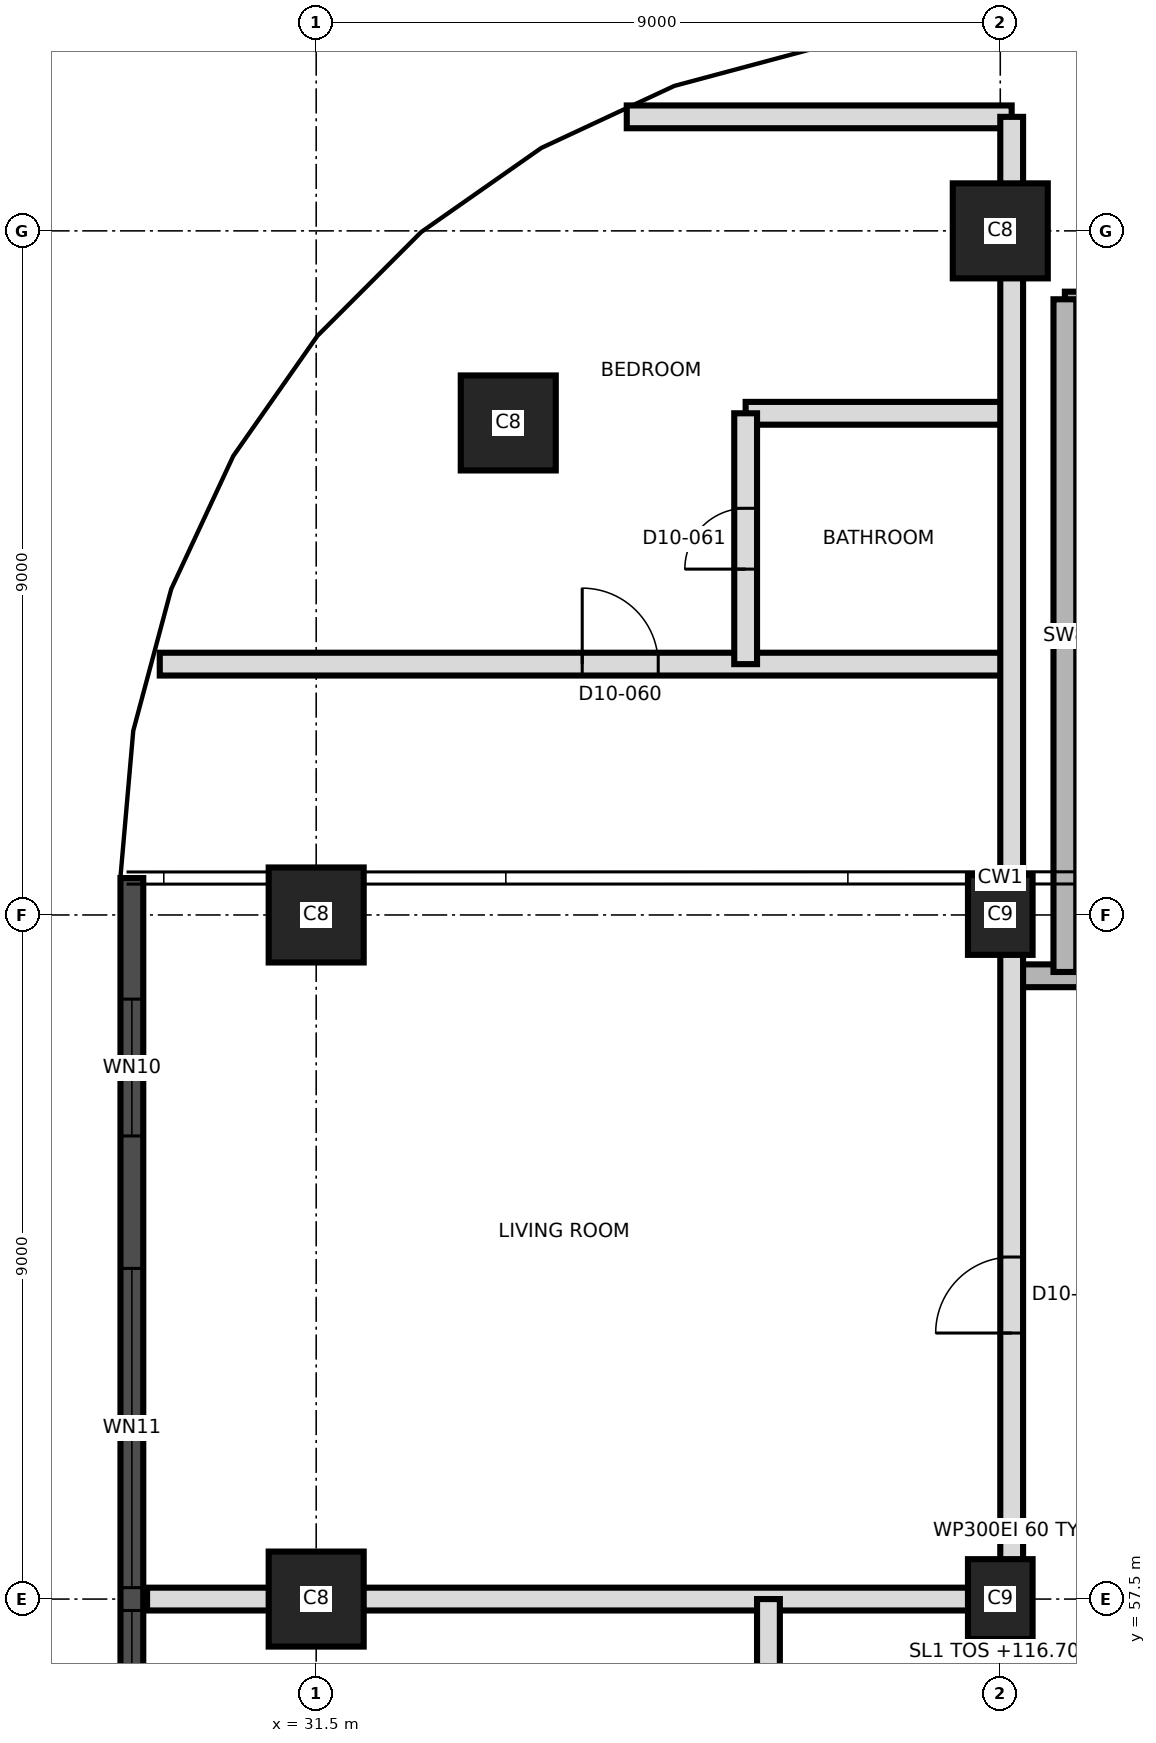
"""IFC4 building model, lengths in metres.
Left out: names, types, materials, properties, quantities, classifications, styles, units other than length and angle.
Written with IfcOpenShell. Run it as: python <this file> out.ifc"""

import sys

from ifc_helpers import new_model, si_unit, direction, frame, frame_2d, origin, origin_2d, place, context, subcontext, project, spatial, rectangle, extrude, element, fill, save


model = new_model("IFC4")
c1 = context("Model", 3, precision=1e-05, world=origin(), true_north=direction((0.0, 1.0)))
c2 = subcontext(c1, "Body", "Model", "MODEL_VIEW")
j1 = project(units=[si_unit("LENGTHUNIT", "METRE"), si_unit("PLANEANGLEUNIT", "RADIAN")], contexts=[c1])
p1 = place(None, origin())
s1 = spatial("IfcSite", under=j1, at=p1, CompositionType="ELEMENT")
p2 = place(p1, origin())
s2 = spatial("IfcBuilding", under=s1, at=p2, CompositionType="ELEMENT")
p3 = place(p2, frame((0.0, 0.0, 116.7)))
s3 = spatial("IfcBuildingStorey", under=s2, at=p3, CompositionType="ELEMENT", Elevation=116.7)
p4 = place(p3, frame((31.5, 57.5, 0.0), z_axis=(0.0, 0.0, 1.0), x_axis=(1.0, 0.0, 0.0)))
e1 = element("IfcColumn", 1, at=p4, inside=s3, PredefinedType="COLUMN", context=c2, shape_type="SweptSolid", body=[
    extrude(rectangle(XDim=1.25, YDim=1.25, at=origin_2d()), origin(), (0.0, 0.0, 1.0), 3.7),
])
p5 = place(p3, frame((40.5, 57.5, 0.0), z_axis=(0.0, 0.0, 1.0), x_axis=(0.0, 1.0, 0.0)))
e2 = element("IfcColumn", 2, at=p5, inside=s3, PredefinedType="COLUMN", context=c2, shape_type="SweptSolid", body=[
    extrude(rectangle(XDim=1.05, YDim=0.85, at=origin_2d()), origin(), (0.0, 0.0, 1.0), 3.7),
])
p6 = place(p3, frame((31.5, 66.5, 0.0), z_axis=(0.0, 0.0, 1.0), x_axis=(1.0, 0.0, 0.0)))
e3 = element("IfcColumn", 3, at=p6, inside=s3, PredefinedType="COLUMN", context=c2, shape_type="SweptSolid", body=[
    extrude(rectangle(XDim=1.25, YDim=1.25, at=origin_2d()), origin(), (0.0, 0.0, 1.0), 3.7),
])
p7 = place(p3, frame((40.5, 66.5, 0.0), z_axis=(0.0, 0.0, 1.0), x_axis=(0.0, 1.0, 0.0)))
e4 = element("IfcColumn", 4, at=p7, inside=s3, PredefinedType="COLUMN", context=c2, shape_type="SweptSolid", body=[
    extrude(rectangle(XDim=1.05, YDim=0.85, at=origin_2d()), origin(), (0.0, 0.0, 1.0), 3.7),
])
for number, where, z_axis, x_axis in (
    (5, (34.027, 72.973, 0.0), (0.0, 0.0, 1.0), (1.0, 0.0, 0.0)),
    (6, (40.5, 75.5, 0.0), (0.0, 0.0, 1.0), (1.0, 0.0, 0.0)),
):
    element("IfcColumn", number, at=place(p3, frame(where, z_axis=z_axis, x_axis=x_axis)), inside=s3, PredefinedType="COLUMN", context=c2, shape_type="SweptSolid", body=[
        extrude(rectangle(XDim=1.25, YDim=1.25, at=origin_2d()), origin(), (0.0, 0.0, 1.0), 3.7),
    ])
p8 = place(p3, frame((29.075, 66.986, 0.0), z_axis=(0.0, 0.0, 1.0), x_axis=(0.0, -1.0, 0.0)))
e7 = element("IfcWall", 7, at=p8, inside=s3, PredefinedType="SOLIDWALL", context=c2, shape_type="SweptSolid", body=[
    extrude(rectangle(XDim=32.976, YDim=0.3, at=frame_2d((16.488, 0.0))), origin(), (0.0, 0.0, 1.0), 3.4),
])
p9 = place(p8, frame((1.593, 0.0, 0.3)))
e8 = element("IfcOpeningElement", 8, at=p9, cuts=e7, PredefinedType="OPENING", context=c2, shape_type="SweptSolid", body=[
    extrude(rectangle(XDim=1.8, YDim=2.4, at=frame_2d((0.9, 1.2))), frame((0.0, 0.16, 0.0), z_axis=(0.0, -1.0, 0.0), x_axis=(1.0, 0.0, 0.0)), (0.0, 0.0, 1.0), 0.32),
])
p10 = place(p8, frame((5.136, 0.0, 0.9)))
e9 = element("IfcOpeningElement", 9, at=p10, cuts=e7, PredefinedType="OPENING", context=c2, shape_type="SweptSolid", body=[
    extrude(rectangle(XDim=4.2, YDim=1.5, at=frame_2d((2.1, 0.75))), frame((0.0, 0.16, 0.0), z_axis=(0.0, -1.0, 0.0), x_axis=(1.0, 0.0, 0.0)), (0.0, 0.0, 1.0), 0.32),
])
p11 = place(p8, frame((9.636, 0.0, 0.9)))
e10 = element("IfcOpeningElement", 10, at=p11, cuts=e7, PredefinedType="OPENING", context=c2, shape_type="SweptSolid", body=[
    extrude(rectangle(XDim=4.2, YDim=1.5, at=frame_2d((2.1, 0.75))), frame((0.0, 0.16, 0.0), z_axis=(0.0, -1.0, 0.0), x_axis=(1.0, 0.0, 0.0)), (0.0, 0.0, 1.0), 0.32),
])
p12 = place(p8, frame((14.136, 0.0, 0.9)))
e11 = element("IfcOpeningElement", 11, at=p12, cuts=e7, PredefinedType="OPENING", context=c2, shape_type="SweptSolid", body=[
    extrude(rectangle(XDim=4.2, YDim=1.5, at=frame_2d((2.1, 0.75))), frame((0.0, 0.16, 0.0), z_axis=(0.0, -1.0, 0.0), x_axis=(1.0, 0.0, 0.0)), (0.0, 0.0, 1.0), 0.32),
])
p13 = place(p8, frame((18.636, 0.0, 0.9)))
e12 = element("IfcOpeningElement", 12, at=p13, cuts=e7, PredefinedType="OPENING", context=c2, shape_type="SweptSolid", body=[
    extrude(rectangle(XDim=4.2, YDim=1.5, at=frame_2d((2.1, 0.75))), frame((0.0, 0.16, 0.0), z_axis=(0.0, -1.0, 0.0), x_axis=(1.0, 0.0, 0.0)), (0.0, 0.0, 1.0), 0.32),
])
p14 = place(p8, frame((23.136, 0.0, 0.9)))
e13 = element("IfcOpeningElement", 13, at=p14, cuts=e7, PredefinedType="OPENING", context=c2, shape_type="SweptSolid", body=[
    extrude(rectangle(XDim=4.2, YDim=1.5, at=frame_2d((2.1, 0.75))), frame((0.0, 0.16, 0.0), z_axis=(0.0, -1.0, 0.0), x_axis=(1.0, 0.0, 0.0)), (0.0, 0.0, 1.0), 0.32),
])
p15 = place(p8, frame((29.331, 0.0, 0.3)))
e14 = element("IfcOpeningElement", 14, at=p15, cuts=e7, PredefinedType="OPENING", context=c2, shape_type="SweptSolid", body=[
    extrude(rectangle(XDim=1.8, YDim=2.4, at=frame_2d((0.9, 1.2))), frame((0.0, 0.16, 0.0), z_axis=(0.0, -1.0, 0.0), x_axis=(1.0, 0.0, 0.0)), (0.0, 0.0, 1.0), 0.32),
])
p16 = place(p3, frame((29.275, 57.5, 0.0), z_axis=(0.0, 0.0, 1.0), x_axis=(1.0, 0.0, 0.0)))
e15 = element("IfcWall", 15, at=p16, inside=s3, PredefinedType="PARTITIONING", context=c2, shape_type="SweptSolid", body=[
    extrude(rectangle(XDim=11.375, YDim=0.3, at=frame_2d((5.688, 0.0))), origin(), (0.0, 0.0, 1.0), 3.4),
])
p17 = place(p3, frame((40.65, 65.7, 0.0), z_axis=(0.0, 0.0, 1.0), x_axis=(1.0, 0.0, 0.0)))
e16 = element("IfcWall", 16, at=p17, inside=s3, PredefinedType="SHEAR", context=c2, shape_type="SweptSolid", body=[
    extrude(rectangle(XDim=6.2, YDim=0.3, at=frame_2d((3.1, 0.0))), origin(), (0.0, 0.0, 1.0), 3.4),
])
p18 = place(p17, frame((1.1, 0.0, 0.0)))
e17 = element("IfcOpeningElement", 17, at=p18, cuts=e16, PredefinedType="OPENING", context=c2, shape_type="SweptSolid", body=[
    extrude(rectangle(XDim=1.2, YDim=2.1, at=frame_2d((0.6, 1.05))), frame((0.0, 0.16, 0.0), z_axis=(0.0, -1.0, 0.0), x_axis=(1.0, 0.0, 0.0)), (0.0, 0.0, 1.0), 0.32),
])
p19 = place(p3, frame((29.442, 69.8, 0.0), z_axis=(0.0, 0.0, 1.0), x_axis=(1.0, 0.0, 0.0)))
e18 = element("IfcWall", 18, at=p19, inside=s3, PredefinedType="PARTITIONING", context=c2, shape_type="SweptSolid", body=[
    extrude(rectangle(XDim=11.208, YDim=0.3, at=frame_2d((5.604, 0.0))), origin(), (0.0, 0.0, 1.0), 3.4),
])
p20 = place(p19, frame((5.558, 0.0, 0.0)))
e19 = element("IfcOpeningElement", 19, at=p20, cuts=e18, PredefinedType="OPENING", context=c2, shape_type="SweptSolid", body=[
    extrude(rectangle(XDim=1.0, YDim=2.1, at=frame_2d((0.5, 1.05))), frame((0.0, 0.16, 0.0), z_axis=(0.0, -1.0, 0.0), x_axis=(1.0, 0.0, 0.0)), (0.0, 0.0, 1.0), 0.32),
])
p21 = place(p3, frame((37.15, 73.1, 0.0), z_axis=(0.0, 0.0, 1.0), x_axis=(1.0, 0.0, 0.0)))
e20 = element("IfcWall", 20, at=p21, inside=s3, PredefinedType="PARTITIONING", context=c2, shape_type="SweptSolid", body=[
    extrude(rectangle(XDim=3.5, YDim=0.3, at=frame_2d((1.75, 0.0))), origin(), (0.0, 0.0, 1.0), 3.4),
])
p22 = place(p3, frame((41.35, 74.55, 0.0), z_axis=(0.0, 0.0, 1.0), x_axis=(1.0, 0.0, 0.0)))
e21 = element("IfcWall", 21, at=p22, inside=s3, PredefinedType="SHEAR", context=c2, shape_type="SweptSolid", body=[
    extrude(rectangle(XDim=3.0, YDim=0.3, at=frame_2d((1.5, 0.0))), origin(), (0.0, 0.0, 1.0), 3.4),
])
p23 = place(p3, frame((35.586, 77.0, 0.0), z_axis=(0.0, 0.0, 1.0), x_axis=(1.0, 0.0, 0.0)))
e22 = element("IfcWall", 22, at=p23, inside=s3, PredefinedType="PARTITIONING", context=c2, shape_type="SweptSolid", body=[
    extrude(rectangle(XDim=5.064, YDim=0.3, at=frame_2d((2.532, 0.0))), origin(), (0.0, 0.0, 1.0), 3.4),
])
p24 = place(p3, frame((37.15, 69.8, 0.0), z_axis=(0.0, 0.0, 1.0), x_axis=(0.0, 1.0, 0.0)))
e23 = element("IfcWall", 23, at=p24, inside=s3, PredefinedType="PARTITIONING", context=c2, shape_type="SweptSolid", body=[
    extrude(rectangle(XDim=3.3, YDim=0.3, at=frame_2d((1.65, 0.0))), origin(), (0.0, 0.0, 1.0), 3.4),
])
p25 = place(p24, frame((1.25, 0.0, 0.0)))
e24 = element("IfcOpeningElement", 24, at=p25, cuts=e23, PredefinedType="OPENING", context=c2, shape_type="SweptSolid", body=[
    extrude(rectangle(XDim=0.8, YDim=2.1, at=frame_2d((0.4, 1.05))), frame((0.0, 0.16, 0.0), z_axis=(0.0, -1.0, 0.0), x_axis=(1.0, 0.0, 0.0)), (0.0, 0.0, 1.0), 0.32),
])
p26 = place(p3, frame((37.45, 54.8, 0.0), z_axis=(0.0, 0.0, 1.0), x_axis=(0.0, 1.0, 0.0)))
e25 = element("IfcWall", 25, at=p26, inside=s3, PredefinedType="PARTITIONING", context=c2, shape_type="SweptSolid", body=[
    extrude(rectangle(XDim=2.7, YDim=0.3, at=frame_2d((1.35, 0.0))), origin(), (0.0, 0.0, 1.0), 3.4),
])
p27 = place(p26, frame((0.95, 0.0, 0.0)))
e26 = element("IfcOpeningElement", 26, at=p27, cuts=e25, PredefinedType="OPENING", context=c2, shape_type="SweptSolid", body=[
    extrude(rectangle(XDim=0.8, YDim=2.1, at=frame_2d((0.4, 1.05))), frame((0.0, 0.16, 0.0), z_axis=(0.0, -1.0, 0.0), x_axis=(1.0, 0.0, 0.0)), (0.0, 0.0, 1.0), 0.32),
])
p28 = place(p3, frame((40.65, 39.8, 0.0), z_axis=(0.0, 0.0, 1.0), x_axis=(0.0, 1.0, 0.0)))
e27 = element("IfcWall", 27, at=p28, inside=s3, PredefinedType="PARTITIONING", context=c2, shape_type="SweptSolid", body=[
    extrude(rectangle(XDim=37.2, YDim=0.3, at=frame_2d((18.6, 0.0))), origin(), (0.0, 0.0, 1.0), 3.4),
])
p29 = place(p28, frame((0.835, 0.0, 0.0)))
e28 = element("IfcOpeningElement", 28, at=p29, cuts=e27, PredefinedType="OPENING", context=c2, shape_type="SweptSolid", body=[
    extrude(rectangle(XDim=1.2, YDim=2.1, at=frame_2d((0.6, 1.05))), frame((0.0, 0.16, 0.0), z_axis=(0.0, -1.0, 0.0), x_axis=(1.0, 0.0, 0.0)), (0.0, 0.0, 1.0), 0.32),
])
p30 = place(p28, frame((4.085, 0.0, 0.0)))
e29 = element("IfcOpeningElement", 29, at=p30, cuts=e27, PredefinedType="OPENING", context=c2, shape_type="SweptSolid", body=[
    extrude(rectangle(XDim=1.0, YDim=2.1, at=frame_2d((0.5, 1.05))), frame((0.0, 0.16, 0.0), z_axis=(0.0, -1.0, 0.0), x_axis=(1.0, 0.0, 0.0)), (0.0, 0.0, 1.0), 0.32),
])
p31 = place(p28, frame((9.835, 0.0, 0.0)))
e30 = element("IfcOpeningElement", 30, at=p31, cuts=e27, PredefinedType="OPENING", context=c2, shape_type="SweptSolid", body=[
    extrude(rectangle(XDim=1.2, YDim=2.1, at=frame_2d((0.6, 1.05))), frame((0.0, 0.16, 0.0), z_axis=(0.0, -1.0, 0.0), x_axis=(1.0, 0.0, 0.0)), (0.0, 0.0, 1.0), 0.32),
])
p32 = place(p28, frame((13.085, 0.0, 0.0)))
e31 = element("IfcOpeningElement", 31, at=p32, cuts=e27, PredefinedType="OPENING", context=c2, shape_type="SweptSolid", body=[
    extrude(rectangle(XDim=1.0, YDim=2.1, at=frame_2d((0.5, 1.05))), frame((0.0, 0.16, 0.0), z_axis=(0.0, -1.0, 0.0), x_axis=(1.0, 0.0, 0.0)), (0.0, 0.0, 1.0), 0.32),
])
p33 = place(p28, frame((21.2, 0.0, 0.0)))
e32 = element("IfcOpeningElement", 32, at=p33, cuts=e27, PredefinedType="OPENING", context=c2, shape_type="SweptSolid", body=[
    extrude(rectangle(XDim=1.0, YDim=2.4, at=frame_2d((0.5, 1.2))), frame((0.0, 0.16, 0.0), z_axis=(0.0, -1.0, 0.0), x_axis=(1.0, 0.0, 0.0)), (0.0, 0.0, 1.0), 0.32),
])
p34 = place(p3, frame((41.35, 65.75, 0.0), z_axis=(0.0, 0.0, 1.0), x_axis=(0.0, 1.0, 0.0)))
e33 = element("IfcWall", 33, at=p34, inside=s3, PredefinedType="SHEAR", context=c2, shape_type="SweptSolid", body=[
    extrude(rectangle(XDim=8.85, YDim=0.3, at=frame_2d((4.425, 0.0))), origin(), (0.0, 0.0, 1.0), 3.4),
])
p35 = place(p9, origin())
e34 = element("IfcWindow", 34, at=p35, inside=s3, PartitioningType="SINGLE_PANEL", PredefinedType="WINDOW", context=c2, shape_type="SweptSolid", body=[
    extrude(rectangle(XDim=1.8, YDim=2.4, at=frame_2d((0.9, 1.2))), frame((0.0, 0.03, 0.0), z_axis=(0.0, -1.0, 0.0), x_axis=(1.0, 0.0, 0.0)), (0.0, 0.0, 1.0), 0.06),
])
fill(e8, e34)
p36 = place(p10, origin())
e35 = element("IfcWindow", 35, at=p36, inside=s3, PartitioningType="SINGLE_PANEL", PredefinedType="WINDOW", context=c2, shape_type="SweptSolid", body=[
    extrude(rectangle(XDim=4.2, YDim=1.5, at=frame_2d((2.1, 0.75))), frame((0.0, 0.03, 0.0), z_axis=(0.0, -1.0, 0.0), x_axis=(1.0, 0.0, 0.0)), (0.0, 0.0, 1.0), 0.06),
])
fill(e9, e35)
p37 = place(p11, origin())
e36 = element("IfcWindow", 36, at=p37, inside=s3, PartitioningType="SINGLE_PANEL", PredefinedType="WINDOW", context=c2, shape_type="SweptSolid", body=[
    extrude(rectangle(XDim=4.2, YDim=1.5, at=frame_2d((2.1, 0.75))), frame((0.0, 0.03, 0.0), z_axis=(0.0, -1.0, 0.0), x_axis=(1.0, 0.0, 0.0)), (0.0, 0.0, 1.0), 0.06),
])
fill(e10, e36)
p38 = place(p33, origin())
e37 = element("IfcDoor", 37, at=p38, inside=s3, OperationType="SINGLE_SWING_LEFT", PredefinedType="DOOR", context=c2, shape_type="SweptSolid", body=[
    extrude(rectangle(XDim=1.0, YDim=2.4, at=frame_2d((0.5, 1.2))), frame((0.0, 0.025, 0.0), z_axis=(0.0, -1.0, 0.0), x_axis=(1.0, 0.0, 0.0)), (0.0, 0.0, 1.0), 0.05),
])
fill(e32, e37)
p39 = place(p20, origin())
e38 = element("IfcDoor", 38, at=p39, inside=s3, OperationType="SINGLE_SWING_LEFT", PredefinedType="DOOR", context=c2, shape_type="SweptSolid", body=[
    extrude(rectangle(XDim=1.0, YDim=2.1, at=frame_2d((0.5, 1.05))), frame((0.0, 0.025, 0.0), z_axis=(0.0, -1.0, 0.0), x_axis=(1.0, 0.0, 0.0)), (0.0, 0.0, 1.0), 0.05),
])
fill(e19, e38)
p40 = place(p25, origin())
e39 = element("IfcDoor", 39, at=p40, inside=s3, OperationType="SINGLE_SWING_RIGHT", PredefinedType="DOOR", context=c2, shape_type="SweptSolid", body=[
    extrude(rectangle(XDim=0.8, YDim=2.1, at=frame_2d((0.4, 1.05))), frame((0.0, 0.025, 0.0), z_axis=(0.0, -1.0, 0.0), x_axis=(1.0, 0.0, 0.0)), (0.0, 0.0, 1.0), 0.05),
])
fill(e24, e39)
save(model, sys.argv[1])
